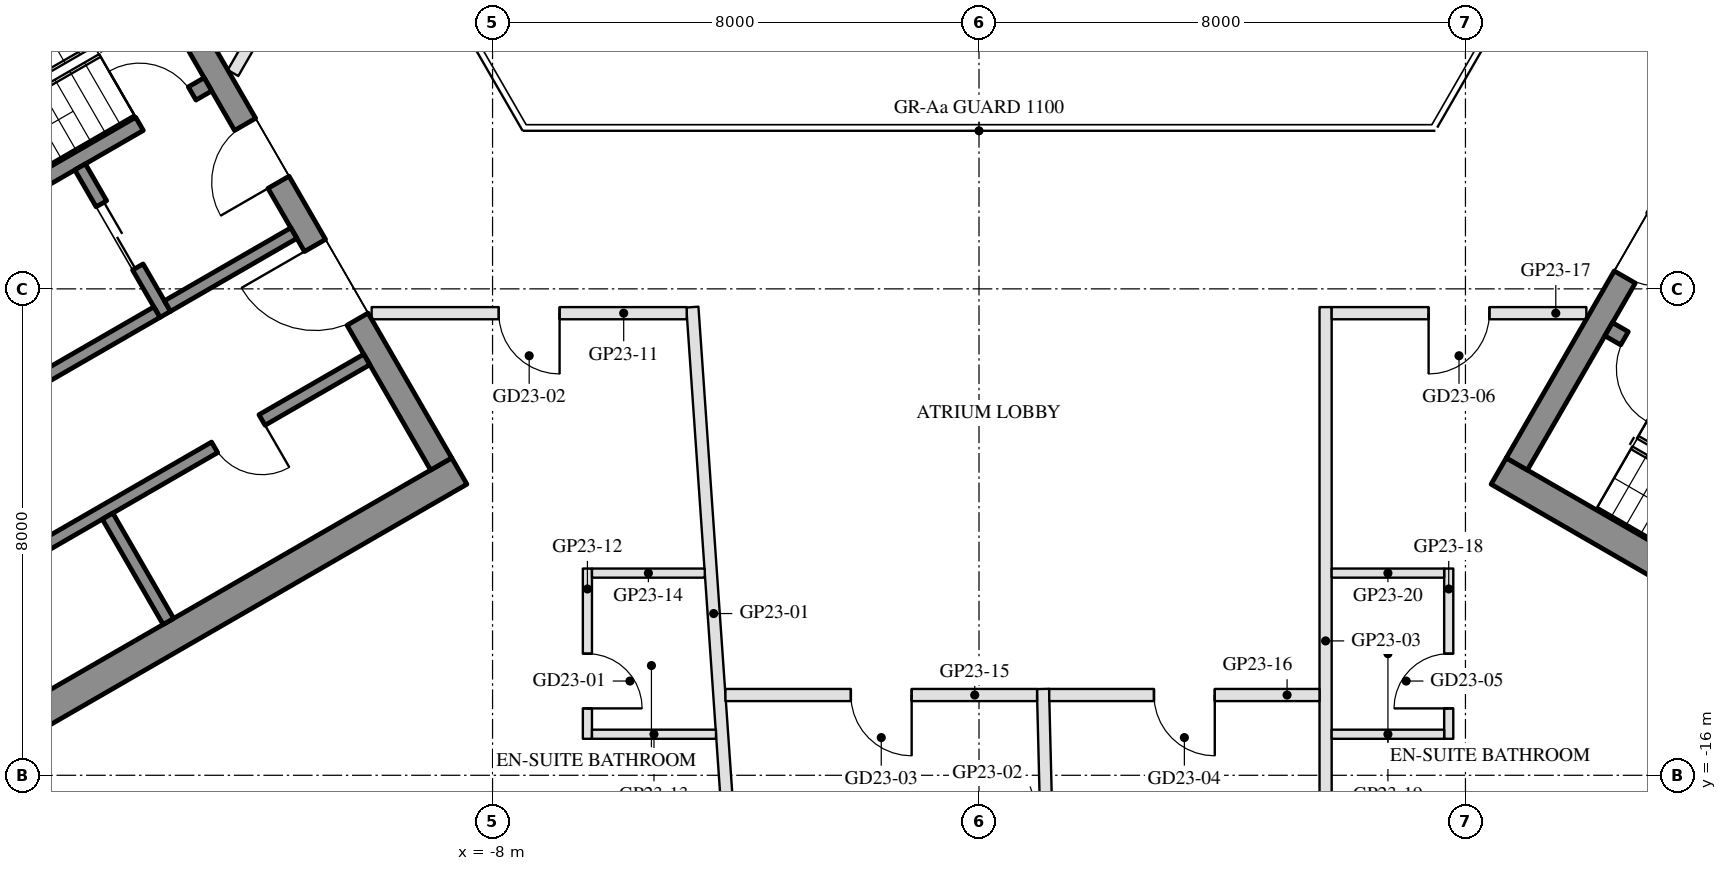
"""IFC4 building model, lengths in metres.
Left out: names, types, materials, properties, quantities, classifications, styles, units other than length and angle.
Written with IfcOpenShell. Run it as: python <this file> out.ifc"""

import sys

from ifc_helpers import new_model, si_unit, direction, frame, frame_2d, origin, place, context, subcontext, project, spatial, rectangle, extrude, element, fill, save


model = new_model("IFC4")
c1 = context("Model", 3, precision=1e-05, world=origin(), true_north=direction((0.0, 1.0)))
c2 = subcontext(c1, "Body", "Model", "MODEL_VIEW")
j1 = project(units=[si_unit("LENGTHUNIT", "METRE"), si_unit("PLANEANGLEUNIT", "RADIAN")], contexts=[c1])
p1 = place(None, origin())
s1 = spatial("IfcSite", under=j1, at=p1, CompositionType="ELEMENT")
p2 = place(p1, origin())
s2 = spatial("IfcBuilding", under=s1, at=p2, CompositionType="ELEMENT")
p3 = place(p2, frame((0.0, 0.0, 246.7)))
s3 = spatial("IfcBuildingStorey", under=s2, at=p3, CompositionType="ELEMENT", Elevation=246.7)
for number, where, z_axis, x_axis in (
    (1, (-13.797, -1.903, 0.0), (0.0, 0.0, 1.0), (-0.866, -0.5, 0.0)),
    (2, (-8.547, -10.997, 0.0), (0.0, 0.0, 1.0), (-0.866, -0.5, 0.0)),
):
    element("IfcWall", number, at=place(p3, frame(where, z_axis=z_axis, x_axis=x_axis)), inside=s3, PredefinedType="SHEAR", context=c2, shape_type="SweptSolid", body=[
        extrude(rectangle(XDim=14.837, YDim=0.5, at=frame_2d((7.418, 0.0))), origin(), (0.0, 0.0, 1.0), 3.5),
    ])
p4 = place(p3, frame((-13.845, -2.22, 0.0), z_axis=(0.0, 0.0, 1.0), x_axis=(0.500004234368, -0.866022959057, 0.0)))
e3 = element("IfcWall", 3, at=p4, inside=s3, PredefinedType="SHEAR", context=c2, shape_type="SweptSolid", body=[
    extrude(rectangle(XDim=10.0, YDim=0.4, at=frame_2d((5.0, 0.0))), origin(), (0.0, 0.0, 1.0), 3.5),
])
p5 = place(p4, frame((3.55, 0.0, 0.0)))
e4 = element("IfcOpeningElement", 4, at=p5, cuts=e3, PredefinedType="OPENING", context=c2, shape_type="SweptSolid", body=[
    extrude(rectangle(XDim=1.1, YDim=2.1, at=frame_2d((0.55, 1.05))), frame((0.0, 0.21, 0.0), z_axis=(0.0, -1.0, 0.0), x_axis=(1.0, 0.0, 0.0)), (0.0, 0.0, 1.0), 0.42),
])
p6 = place(p4, frame((5.85, 0.0, 0.0)))
e5 = element("IfcOpeningElement", 5, at=p6, cuts=e3, PredefinedType="OPENING", context=c2, shape_type="SweptSolid", body=[
    extrude(rectangle(XDim=1.4, YDim=2.1, at=frame_2d((0.7, 1.05))), frame((0.0, 0.21, 0.0), z_axis=(0.0, -1.0, 0.0), x_axis=(1.0, 0.0, 0.0)), (0.0, 0.0, 1.0), 0.42),
])
p7 = place(p3, frame((-12.681, -4.636, 0.0), z_axis=(0.0, 0.0, 1.0), x_axis=(-0.866021702275, -0.500006411147, 0.0)))
e6 = element("IfcWall", 6, at=p7, inside=s3, PredefinedType="SHEAR", context=c2, shape_type="SweptSolid", body=[
    extrude(rectangle(XDim=6.45, YDim=0.25, at=frame_2d((3.225, 0.0))), origin(), (0.0, 0.0, 1.0), 3.5),
])
p8 = place(p7, frame((0.3, 0.0, 0.0)))
e7 = element("IfcOpeningElement", 7, at=p8, cuts=e6, PredefinedType="OPENING", context=c2, shape_type="SweptSolid", body=[
    extrude(rectangle(XDim=1.0, YDim=2.1, at=frame_2d((0.5, 1.05))), frame((0.0, 0.135, 0.0), z_axis=(0.0, -1.0, 0.0), x_axis=(1.0, 0.0, 0.0)), (0.0, 0.0, 1.0), 0.27),
])
p9 = place(p3, frame((-14.783, -5.995, 0.0), z_axis=(0.0, 0.0, 1.0), x_axis=(0.49994636267, -0.866056369097, 0.0)))
e8 = element("IfcWall", 8, at=p9, inside=s3, PredefinedType="SHEAR", context=c2, shape_type="SweptSolid", body=[
    extrude(rectangle(XDim=2.8, YDim=0.2, at=frame_2d((1.4, 0.0))), origin(), (0.0, 0.0, 1.0), 3.5),
])
p10 = place(p9, frame((0.7, 0.0, 0.0)))
e9 = element("IfcOpeningElement", 9, at=p10, cuts=e8, PredefinedType="OPENING", context=c2, shape_type="SweptSolid", body=[
    extrude(rectangle(XDim=1.2, YDim=2.1, at=frame_2d((0.6, 1.05))), frame((0.0, 0.11, 0.0), z_axis=(0.0, -1.0, 0.0), x_axis=(1.0, 0.0, 0.0)), (0.0, 0.0, 1.0), 0.22),
])
p11 = place(p3, frame((-13.52, -8.383, 0.0), z_axis=(0.0, 0.0, 1.0), x_axis=(-0.866034573852, -0.49998411664, 0.0)))
e10 = element("IfcWall", 10, at=p11, inside=s3, PredefinedType="SHEAR", context=c2, shape_type="SweptSolid", body=[
    extrude(rectangle(XDim=2.8, YDim=0.2, at=frame_2d((1.4, 0.0))), origin(), (0.0, 0.0, 1.0), 3.5),
])
p12 = place(p3, frame((-11.268, -7.083, 0.0), z_axis=(0.0, 0.0, 1.0), x_axis=(-0.866050077142, -0.499957262057, 0.0)))
e11 = element("IfcWall", 11, at=p12, inside=s3, PredefinedType="SHEAR", context=c2, shape_type="SweptSolid", body=[
    extrude(rectangle(XDim=2.4, YDim=0.2, at=frame_2d((1.2, 0.0))), origin(), (0.0, 0.0, 1.0), 3.5),
])
p13 = place(p3, frame((-10.068, -9.162, 0.0), z_axis=(0.0, 0.0, 1.0), x_axis=(-0.866032725843, -0.499987317609, 0.0)))
e12 = element("IfcWall", 12, at=p13, inside=s3, PredefinedType="SHEAR", context=c2, shape_type="SweptSolid", body=[
    extrude(rectangle(XDim=10.16, YDim=0.2, at=frame_2d((5.08, 0.0))), origin(), (0.0, 0.0, 1.0), 3.5),
])
p14 = place(p13, frame((1.99, 0.0, 0.0)))
e13 = element("IfcOpeningElement", 13, at=p14, cuts=e12, PredefinedType="OPENING", context=c2, shape_type="SweptSolid", body=[
    extrude(rectangle(XDim=0.9, YDim=2.1, at=frame_2d((0.45, 1.05))), frame((0.0, 0.11, 0.0), z_axis=(0.0, -1.0, 0.0), x_axis=(1.0, 0.0, 0.0)), (0.0, 0.0, 1.0), 0.22),
])
p15 = place(p13, frame((7.07, 0.0, 0.0)))
e14 = element("IfcOpeningElement", 14, at=p15, cuts=e12, PredefinedType="OPENING", context=c2, shape_type="SweptSolid", body=[
    extrude(rectangle(XDim=0.9, YDim=2.1, at=frame_2d((0.45, 1.05))), frame((0.0, 0.11, 0.0), z_axis=(0.0, -1.0, 0.0), x_axis=(1.0, 0.0, 0.0)), (0.0, 0.0, 1.0), 0.22),
])
p16 = place(p3, frame((-14.331, -11.738, 0.0), z_axis=(0.0, 0.0, 1.0), x_axis=(0.499972520799, -0.866041268327, 0.0)))
e15 = element("IfcWall", 15, at=p16, inside=s3, PredefinedType="SHEAR", context=c2, shape_type="SweptSolid", body=[
    extrude(rectangle(XDim=2.0, YDim=0.2, at=frame_2d((1.0, 0.0))), origin(), (0.0, 0.0, 1.0), 3.5),
])
p17 = place(p3, frame((8.547, -10.997, 0.0), z_axis=(0.0, 0.0, 1.0), x_axis=(0.866025009528, -0.500000682871, 0.0)))
e16 = element("IfcWall", 16, at=p17, inside=s3, PredefinedType="SHEAR", context=c2, shape_type="SweptSolid", body=[
    extrude(rectangle(XDim=14.837, YDim=0.5, at=frame_2d((7.418, 0.0))), origin(), (0.0, 0.0, 1.0), 3.5),
])
p18 = place(p3, frame((8.845, -10.88, 0.0), z_axis=(0.0, 0.0, 1.0), x_axis=(0.500004234368, 0.866022959057, 0.0)))
e17 = element("IfcWall", 17, at=p18, inside=s3, PredefinedType="SHEAR", context=c2, shape_type="SweptSolid", body=[
    extrude(rectangle(XDim=10.0, YDim=0.4, at=frame_2d((5.0, 0.0))), origin(), (0.0, 0.0, 1.0), 3.5),
])
p19 = place(p18, frame((3.55, 0.0, 0.0)))
e18 = element("IfcOpeningElement", 18, at=p19, cuts=e17, PredefinedType="OPENING", context=c2, shape_type="SweptSolid", body=[
    extrude(rectangle(XDim=1.1, YDim=2.1, at=frame_2d((0.55, 1.05))), frame((0.0, 0.21, 0.0), z_axis=(0.0, -1.0, 0.0), x_axis=(1.0, 0.0, 0.0)), (0.0, 0.0, 1.0), 0.42),
])
p20 = place(p18, frame((5.85, 0.0, 0.0)))
e19 = element("IfcOpeningElement", 19, at=p20, cuts=e17, PredefinedType="OPENING", context=c2, shape_type="SweptSolid", body=[
    extrude(rectangle(XDim=1.4, YDim=2.1, at=frame_2d((0.7, 1.05))), frame((0.0, 0.21, 0.0), z_axis=(0.0, -1.0, 0.0), x_axis=(1.0, 0.0, 0.0)), (0.0, 0.0, 1.0), 0.42),
])
p21 = place(p3, frame((10.356, -8.664, 0.0), z_axis=(0.0, 0.0, 1.0), x_axis=(0.866028629588, -0.499994412703, 0.0)))
e20 = element("IfcWall", 20, at=p21, inside=s3, PredefinedType="SHEAR", context=c2, shape_type="SweptSolid", body=[
    extrude(rectangle(XDim=6.45, YDim=0.25, at=frame_2d((3.225, 0.0))), origin(), (0.0, 0.0, 1.0), 3.5),
])
p22 = place(p21, frame((0.3, 0.0, 0.0)))
e21 = element("IfcOpeningElement", 21, at=p22, cuts=e20, PredefinedType="OPENING", context=c2, shape_type="SweptSolid", body=[
    extrude(rectangle(XDim=1.0, YDim=2.1, at=frame_2d((0.5, 1.05))), frame((0.0, 0.135, 0.0), z_axis=(0.0, -1.0, 0.0), x_axis=(1.0, 0.0, 0.0)), (0.0, 0.0, 1.0), 0.27),
])
p23 = place(p3, frame((-4.013, -18.38, 0.0), z_axis=(0.0, 0.0, 1.0), x_axis=(-0.06939415619, 0.997589319854, 0.0)))
e22 = element("IfcWall", 22, at=p23, inside=s3, PredefinedType="PARTITIONING", context=c2, shape_type="SweptSolid", body=[
    extrude(rectangle(XDim=10.104, YDim=0.2, at=frame_2d((5.052, 0.0))), origin(), (0.0, 0.0, 1.0), 2.95),
])
p24 = place(p3, frame((1.17, -19.28, 0.0), z_axis=(0.0, 0.0, 1.0), x_axis=(-0.025029816209, 0.999686705073, 0.0)))
e23 = element("IfcWall", 23, at=p24, inside=s3, PredefinedType="PARTITIONING", context=c2, shape_type="SweptSolid", body=[
    extrude(rectangle(XDim=4.701, YDim=0.2, at=frame_2d((2.351, 0.0))), origin(), (0.0, 0.0, 1.0), 3.16),
])
p25 = place(p3, frame((5.7, -19.28, 0.0), z_axis=(0.0, 0.0, 1.0), x_axis=(0.0, 1.0, 0.0)))
e24 = element("IfcWall", 24, at=p25, inside=s3, PredefinedType="PARTITIONING", context=c2, shape_type="SweptSolid", body=[
    extrude(rectangle(XDim=10.98, YDim=0.2, at=frame_2d((5.49, 0.0))), origin(), (0.0, 0.0, 1.0), 3.16),
])
p26 = place(p3, frame((-4.807, -8.4, 0.0), z_axis=(0.0, 0.0, 1.0), x_axis=(-1.0, 0.0, 0.0)))
e25 = element("IfcWall", 25, at=p26, inside=s3, PredefinedType="PARTITIONING", context=c2, shape_type="SweptSolid", body=[
    extrude(rectangle(XDim=5.181, YDim=0.2, at=frame_2d((2.591, 0.0))), origin(), (0.0, 0.0, 1.0), 2.95),
])
p27 = place(p26, frame((2.091, 0.0, 0.0)))
e26 = element("IfcOpeningElement", 26, at=p27, cuts=e25, PredefinedType="OPENING", context=c2, shape_type="SweptSolid", body=[
    extrude(rectangle(XDim=1.0, YDim=2.1, at=frame_2d((0.5, 1.05))), frame((0.0, 0.11, 0.0), z_axis=(0.0, -1.0, 0.0), x_axis=(1.0, 0.0, 0.0)), (0.0, 0.0, 1.0), 0.22),
])
p28 = place(p3, frame((-6.44, -12.6, 0.0), z_axis=(0.0, 0.0, 1.0), x_axis=(0.0, -1.0, 0.0)))
e27 = element("IfcWall", 27, at=p28, inside=s3, PredefinedType="PARTITIONING", context=c2, shape_type="SweptSolid", body=[
    extrude(rectangle(XDim=2.8, YDim=0.15, at=frame_2d((1.4, 0.0))), origin(), (0.0, 0.0, 1.0), 3.55),
])
p29 = place(p28, frame((1.4, 0.0, 0.0)))
e28 = element("IfcOpeningElement", 28, at=p29, cuts=e27, PredefinedType="OPENING", context=c2, shape_type="SweptSolid", body=[
    extrude(rectangle(XDim=0.9, YDim=2.1, at=frame_2d((0.45, 1.05))), frame((0.0, 0.085, 0.0), z_axis=(0.0, -1.0, 0.0), x_axis=(1.0, 0.0, 0.0)), (0.0, 0.0, 1.0), 0.17),
])
p30 = place(p3, frame((-6.365, -15.325, 0.0), z_axis=(0.0, 0.0, 1.0), x_axis=(1.0, 0.0, 0.0)))
e29 = element("IfcWall", 29, at=p30, inside=s3, PredefinedType="PARTITIONING", context=c2, shape_type="SweptSolid", body=[
    extrude(rectangle(XDim=2.04, YDim=0.15, at=frame_2d((1.02, 0.0))), origin(), (0.0, 0.0, 1.0), 3.55),
])
p31 = place(p3, frame((-6.365, -12.675, 0.0), z_axis=(0.0, 0.0, 1.0), x_axis=(1.0, 0.0, 0.0)))
e30 = element("IfcWall", 30, at=p31, inside=s3, PredefinedType="PARTITIONING", context=c2, shape_type="SweptSolid", body=[
    extrude(rectangle(XDim=1.855, YDim=0.15, at=frame_2d((0.928, 0.0))), origin(), (0.0, 0.0, 1.0), 3.55),
])
p32 = place(p3, frame((0.955, -14.68, 0.0), z_axis=(0.0, 0.0, 1.0), x_axis=(-1.0, 0.0, 0.0)))
e31 = element("IfcWall", 31, at=p32, inside=s3, PredefinedType="PARTITIONING", context=c2, shape_type="SweptSolid", body=[
    extrude(rectangle(XDim=5.125, YDim=0.2, at=frame_2d((2.562, 0.0))), origin(), (0.0, 0.0, 1.0), 2.95),
])
p33 = place(p32, frame((2.062, 0.0, 0.0)))
e32 = element("IfcOpeningElement", 32, at=p33, cuts=e31, PredefinedType="OPENING", context=c2, shape_type="SweptSolid", body=[
    extrude(rectangle(XDim=1.0, YDim=2.1, at=frame_2d((0.5, 1.05))), frame((0.0, 0.11, 0.0), z_axis=(0.0, -1.0, 0.0), x_axis=(1.0, 0.0, 0.0)), (0.0, 0.0, 1.0), 0.22),
])
p34 = place(p3, frame((5.6, -14.68, 0.0), z_axis=(0.0, 0.0, 1.0), x_axis=(-1.0, 0.0, 0.0)))
e33 = element("IfcWall", 33, at=p34, inside=s3, PredefinedType="PARTITIONING", context=c2, shape_type="SweptSolid", body=[
    extrude(rectangle(XDim=4.445, YDim=0.2, at=frame_2d((2.223, 0.0))), origin(), (0.0, 0.0, 1.0), 2.95),
])
p35 = place(p34, frame((1.723, 0.0, 0.0)))
e34 = element("IfcOpeningElement", 34, at=p35, cuts=e33, PredefinedType="OPENING", context=c2, shape_type="SweptSolid", body=[
    extrude(rectangle(XDim=1.0, YDim=2.1, at=frame_2d((0.5, 1.05))), frame((0.0, 0.11, 0.0), z_axis=(0.0, -1.0, 0.0), x_axis=(1.0, 0.0, 0.0)), (0.0, 0.0, 1.0), 0.22),
])
p36 = place(p3, frame((9.988, -8.4, 0.0), z_axis=(0.0, 0.0, 1.0), x_axis=(-1.0, 0.0, 0.0)))
e35 = element("IfcWall", 35, at=p36, inside=s3, PredefinedType="PARTITIONING", context=c2, shape_type="SweptSolid", body=[
    extrude(rectangle(XDim=4.188, YDim=0.2, at=frame_2d((2.094, 0.0))), origin(), (0.0, 0.0, 1.0), 2.95),
])
p37 = place(p36, frame((1.594, 0.0, 0.0)))
e36 = element("IfcOpeningElement", 36, at=p37, cuts=e35, PredefinedType="OPENING", context=c2, shape_type="SweptSolid", body=[
    extrude(rectangle(XDim=1.0, YDim=2.1, at=frame_2d((0.5, 1.05))), frame((0.0, 0.11, 0.0), z_axis=(0.0, -1.0, 0.0), x_axis=(1.0, 0.0, 0.0)), (0.0, 0.0, 1.0), 0.22),
])
p38 = place(p3, frame((7.725, -15.4, 0.0), z_axis=(0.0, 0.0, 1.0), x_axis=(0.0, 1.0, 0.0)))
e37 = element("IfcWall", 37, at=p38, inside=s3, PredefinedType="PARTITIONING", context=c2, shape_type="SweptSolid", body=[
    extrude(rectangle(XDim=2.8, YDim=0.15, at=frame_2d((1.4, 0.0))), origin(), (0.0, 0.0, 1.0), 2.95),
])
p39 = place(p38, frame((0.5, 0.0, 0.0)))
e38 = element("IfcOpeningElement", 38, at=p39, cuts=e37, PredefinedType="OPENING", context=c2, shape_type="SweptSolid", body=[
    extrude(rectangle(XDim=0.9, YDim=2.1, at=frame_2d((0.45, 1.05))), frame((0.0, 0.085, 0.0), z_axis=(0.0, -1.0, 0.0), x_axis=(1.0, 0.0, 0.0)), (0.0, 0.0, 1.0), 0.17),
])
for number, where, z_axis, x_axis in (
    (39, (5.8, -15.325, 0.0), (0.0, 0.0, 1.0), (1.0, 0.0, 0.0)),
    (40, (5.8, -12.675, 0.0), (0.0, 0.0, 1.0), (1.0, 0.0, 0.0)),
):
    element("IfcWall", number, at=place(p3, frame(where, z_axis=z_axis, x_axis=x_axis)), inside=s3, PredefinedType="PARTITIONING", context=c2, shape_type="SweptSolid", body=[
        extrude(rectangle(XDim=1.85, YDim=0.15, at=frame_2d((0.925, 0.0))), origin(), (0.0, 0.0, 1.0), 3.55),
    ])
p40 = place(p3, frame((10.375, -1.169, 0.0), z_axis=(0.0, 0.0, 1.0), x_axis=(0.500055316652, -0.865993464345, 0.0)))
e41 = element("IfcWall", 41, at=p40, inside=s3, PredefinedType="PARTITIONING", context=c2, shape_type="SweptSolid", body=[
    extrude(rectangle(XDim=3.788, YDim=0.2, at=frame_2d((1.894, 0.0))), origin(), (0.0, 0.0, 1.0), 2.95),
])
p41 = place(p40, frame((1.394, 0.0, 0.0)))
e42 = element("IfcOpeningElement", 42, at=p41, cuts=e41, PredefinedType="OPENING", context=c2, shape_type="SweptSolid", body=[
    extrude(rectangle(XDim=1.0, YDim=2.1, at=frame_2d((0.5, 1.05))), frame((0.0, 0.11, 0.0), z_axis=(0.0, -1.0, 0.0), x_axis=(1.0, 0.0, 0.0)), (0.0, 0.0, 1.0), 0.22),
])
p42 = place(p3, frame((-12.269, -4.45, 0.0), z_axis=(0.0, 0.0, 1.0), x_axis=(0.500011931275, 0.86601851515, 0.0)))
e43 = element("IfcWall", 43, at=p42, inside=s3, PredefinedType="PARTITIONING", context=c2, shape_type="SweptSolid", body=[
    extrude(rectangle(XDim=4.088, YDim=0.2, at=frame_2d((2.044, 0.0))), origin(), (0.0, 0.0, 1.0), 2.95),
])
p43 = place(p42, frame((1.544, 0.0, 0.0)))
e44 = element("IfcOpeningElement", 44, at=p43, cuts=e43, PredefinedType="OPENING", context=c2, shape_type="SweptSolid", body=[
    extrude(rectangle(XDim=1.0, YDim=2.1, at=frame_2d((0.5, 1.05))), frame((0.0, 0.11, 0.0), z_axis=(0.0, -1.0, 0.0), x_axis=(1.0, 0.0, 0.0)), (0.0, 0.0, 1.0), 0.22),
])
p44 = place(p10, origin())
e45 = element("IfcDoor", 45, at=p44, inside=s3, OperationType="DOUBLE_DOOR_SLIDING", PredefinedType="DOOR", context=c2, shape_type="SweptSolid", body=[
    extrude(rectangle(XDim=1.2, YDim=2.1, at=frame_2d((0.6, 1.05))), frame((0.0, 0.025, 0.0), z_axis=(0.0, -1.0, 0.0), x_axis=(1.0, 0.0, 0.0)), (0.0, 0.0, 1.0), 0.05),
])
fill(e9, e45)
p45 = place(p14, origin())
e46 = element("IfcDoor", 46, at=p45, inside=s3, OperationType="SINGLE_SWING_LEFT", PredefinedType="DOOR", context=c2, shape_type="SweptSolid", body=[
    extrude(rectangle(XDim=0.9, YDim=2.1, at=frame_2d((0.45, 1.05))), frame((0.0, 0.025, 0.0), z_axis=(0.0, -1.0, 0.0), x_axis=(1.0, 0.0, 0.0)), (0.0, 0.0, 1.0), 0.05),
])
fill(e13, e46)
p46 = place(p5, frame((1.1, 0.0, 0.0), z_axis=(0.0, 0.0, 1.0), x_axis=(-1.0, 0.0, 0.0)))
e47 = element("IfcDoor", 47, at=p46, inside=s3, OperationType="SINGLE_SWING_LEFT", PredefinedType="DOOR", context=c2, shape_type="SweptSolid", body=[
    extrude(rectangle(XDim=1.1, YDim=2.1, at=frame_2d((0.55, 1.05))), frame((0.0, 0.025, 0.0), z_axis=(0.0, -1.0, 0.0), x_axis=(1.0, 0.0, 0.0)), (0.0, 0.0, 1.0), 0.05),
])
fill(e4, e47)
p47 = place(p6, frame((1.4, 0.0, 0.0), z_axis=(0.0, 0.0, 1.0), x_axis=(-1.0, 0.0, 0.0)))
e48 = element("IfcDoor", 48, at=p47, inside=s3, OperationType="DOUBLE_DOOR_SINGLE_SWING", PredefinedType="DOOR", context=c2, shape_type="SweptSolid", body=[
    extrude(rectangle(XDim=1.4, YDim=2.1, at=frame_2d((0.7, 1.05))), frame((0.0, 0.025, 0.0), z_axis=(0.0, -1.0, 0.0), x_axis=(1.0, 0.0, 0.0)), (0.0, 0.0, 1.0), 0.05),
])
fill(e5, e48)
p48 = place(p8, frame((1.0, 0.0, 0.0), z_axis=(0.0, 0.0, 1.0), x_axis=(-1.0, 0.0, 0.0)))
e49 = element("IfcDoor", 49, at=p48, inside=s3, OperationType="SINGLE_SWING_LEFT", PredefinedType="DOOR", context=c2, shape_type="SweptSolid", body=[
    extrude(rectangle(XDim=1.0, YDim=2.1, at=frame_2d((0.5, 1.05))), frame((0.0, 0.025, 0.0), z_axis=(0.0, -1.0, 0.0), x_axis=(1.0, 0.0, 0.0)), (0.0, 0.0, 1.0), 0.05),
])
fill(e7, e49)
p49 = place(p19, frame((1.1, 0.0, 0.0), z_axis=(0.0, 0.0, 1.0), x_axis=(-1.0, 0.0, 0.0)))
e50 = element("IfcDoor", 50, at=p49, inside=s3, OperationType="SINGLE_SWING_LEFT", PredefinedType="DOOR", context=c2, shape_type="SweptSolid", body=[
    extrude(rectangle(XDim=1.1, YDim=2.1, at=frame_2d((0.55, 1.05))), frame((0.0, 0.025, 0.0), z_axis=(0.0, -1.0, 0.0), x_axis=(1.0, 0.0, 0.0)), (0.0, 0.0, 1.0), 0.05),
])
fill(e18, e50)
p50 = place(p22, frame((1.0, 0.0, 0.0), z_axis=(0.0, 0.0, 1.0), x_axis=(-1.0, 0.0, 0.0)))
e51 = element("IfcDoor", 51, at=p50, inside=s3, OperationType="SINGLE_SWING_LEFT", PredefinedType="DOOR", context=c2, shape_type="SweptSolid", body=[
    extrude(rectangle(XDim=1.0, YDim=2.1, at=frame_2d((0.5, 1.05))), frame((0.0, 0.025, 0.0), z_axis=(0.0, -1.0, 0.0), x_axis=(1.0, 0.0, 0.0)), (0.0, 0.0, 1.0), 0.05),
])
fill(e21, e51)
p51 = place(p29, origin())
e52 = element("IfcDoor", 52, at=p51, inside=s3, OperationType="SINGLE_SWING_RIGHT", PredefinedType="DOOR", context=c2, shape_type="SweptSolid", body=[
    extrude(rectangle(XDim=0.9, YDim=2.1, at=frame_2d((0.45, 1.05))), frame((0.0, 0.025, 0.0), z_axis=(0.0, -1.0, 0.0), x_axis=(1.0, 0.0, 0.0)), (0.0, 0.0, 1.0), 0.05),
])
fill(e28, e52)
p52 = place(p27, origin())
e53 = element("IfcDoor", 53, at=p52, inside=s3, OperationType="SINGLE_SWING_LEFT", PredefinedType="DOOR", context=c2, shape_type="SweptSolid", body=[
    extrude(rectangle(XDim=1.0, YDim=2.1, at=frame_2d((0.5, 1.05))), frame((0.0, 0.025, 0.0), z_axis=(0.0, -1.0, 0.0), x_axis=(1.0, 0.0, 0.0)), (0.0, 0.0, 1.0), 0.05),
])
fill(e26, e53)
p53 = place(p33, origin())
e54 = element("IfcDoor", 54, at=p53, inside=s3, OperationType="SINGLE_SWING_LEFT", PredefinedType="DOOR", context=c2, shape_type="SweptSolid", body=[
    extrude(rectangle(XDim=1.0, YDim=2.1, at=frame_2d((0.5, 1.05))), frame((0.0, 0.025, 0.0), z_axis=(0.0, -1.0, 0.0), x_axis=(1.0, 0.0, 0.0)), (0.0, 0.0, 1.0), 0.05),
])
fill(e32, e54)
p54 = place(p35, origin())
e55 = element("IfcDoor", 55, at=p54, inside=s3, OperationType="SINGLE_SWING_LEFT", PredefinedType="DOOR", context=c2, shape_type="SweptSolid", body=[
    extrude(rectangle(XDim=1.0, YDim=2.1, at=frame_2d((0.5, 1.05))), frame((0.0, 0.025, 0.0), z_axis=(0.0, -1.0, 0.0), x_axis=(1.0, 0.0, 0.0)), (0.0, 0.0, 1.0), 0.05),
])
fill(e34, e55)
p55 = place(p39, origin())
e56 = element("IfcDoor", 56, at=p55, inside=s3, OperationType="SINGLE_SWING_LEFT", PredefinedType="DOOR", context=c2, shape_type="SweptSolid", body=[
    extrude(rectangle(XDim=0.9, YDim=2.1, at=frame_2d((0.45, 1.05))), frame((0.0, 0.025, 0.0), z_axis=(0.0, -1.0, 0.0), x_axis=(1.0, 0.0, 0.0)), (0.0, 0.0, 1.0), 0.05),
])
fill(e38, e56)
p56 = place(p37, origin())
e57 = element("IfcDoor", 57, at=p56, inside=s3, OperationType="SINGLE_SWING_RIGHT", PredefinedType="DOOR", context=c2, shape_type="SweptSolid", body=[
    extrude(rectangle(XDim=1.0, YDim=2.1, at=frame_2d((0.5, 1.05))), frame((0.0, 0.025, 0.0), z_axis=(0.0, -1.0, 0.0), x_axis=(1.0, 0.0, 0.0)), (0.0, 0.0, 1.0), 0.05),
])
fill(e36, e57)
save(model, sys.argv[1])
